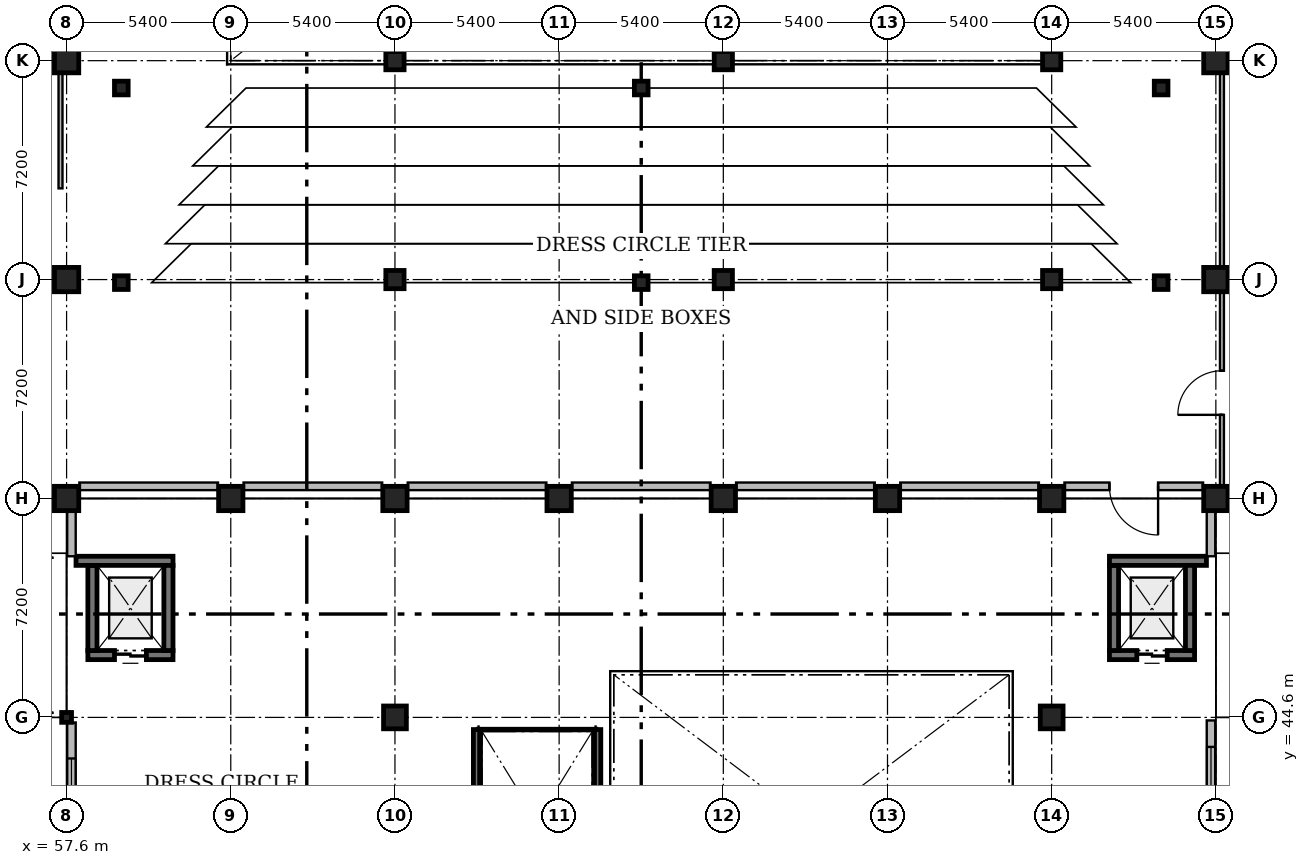
"""IFC4 building model, lengths in metres.
Left out: names, types, materials, properties, quantities, classifications, styles, units other than length and angle.
Written with IfcOpenShell. Run it as: python <this file> out.ifc"""

import sys

from ifc_helpers import new_model, si_unit, direction, frame, frame_2d, origin, origin_2d, place, context, subcontext, project, spatial, rectangle, circle, hollow_circle, extrude, element, fill, save


model = new_model("IFC4")
c1 = context("Model", 3, precision=1e-05, world=origin(), true_north=direction((0.0, 1.0)))
c2 = subcontext(c1, "Body", "Model", "MODEL_VIEW")
j1 = project(units=[si_unit("LENGTHUNIT", "METRE"), si_unit("PLANEANGLEUNIT", "RADIAN")], contexts=[c1])
p1 = place(None, origin())
s1 = spatial("IfcSite", under=j1, at=p1, CompositionType="ELEMENT")
p2 = place(p1, origin())
s2 = spatial("IfcBuilding", under=s1, at=p2, CompositionType="ELEMENT")
p3 = place(p2, frame((0.0, 0.0, 4.8)))
s3 = spatial("IfcBuildingStorey", under=s2, at=p3, CompositionType="ELEMENT", Elevation=4.8)
p4 = place(p3, frame((68.4, 44.6, 0.0), z_axis=(0.0, 0.0, 1.0), x_axis=(1.0, 0.0, 0.0)))
e1 = element("IfcColumn", 1, at=p4, inside=s3, PredefinedType="COLUMN", context=c2, shape_type="SweptSolid", body=[
    extrude(circle(Radius=0.375, at=origin_2d()), origin(), (0.0, 0.0, 1.0), 4.2),
])
p5 = place(p3, frame((68.4, 51.8, 0.0), z_axis=(0.0, 0.0, 1.0), x_axis=(1.0, 0.0, 0.0)))
e2 = element("IfcColumn", 2, at=p5, inside=s3, PredefinedType="COLUMN", context=c2, shape_type="SweptSolid", body=[
    extrude(rectangle(XDim=0.8, YDim=0.8, at=origin_2d()), origin(), (0.0, 0.0, 1.0), 4.2),
])
for number, where, z_axis, x_axis in (
    (3, (68.4, 59.0, 0.0), (0.0, 0.0, 1.0), (1.0, 0.0, 0.0)),
    (4, (68.4, 66.2, 0.0), (0.0, 0.0, 1.0), (1.0, 0.0, 0.0)),
):
    element("IfcColumn", number, at=place(p3, frame(where, z_axis=z_axis, x_axis=x_axis)), inside=s3, PredefinedType="COLUMN", context=c2, shape_type="SweptSolid", body=[
        extrude(rectangle(XDim=0.6, YDim=0.6, at=origin_2d()), origin(), (0.0, 0.0, 1.0), 4.2),
    ])
for number, where, z_axis, x_axis in (
    (5, (73.8, 51.8, 0.0), (0.0, 0.0, 1.0), (1.0, 0.0, 0.0)),
    (6, (79.2, 51.8, 0.0), (0.0, 0.0, 1.0), (1.0, 0.0, 0.0)),
):
    element("IfcColumn", number, at=place(p3, frame(where, z_axis=z_axis, x_axis=x_axis)), inside=s3, PredefinedType="COLUMN", context=c2, shape_type="SweptSolid", body=[
        extrude(rectangle(XDim=0.8, YDim=0.8, at=origin_2d()), origin(), (0.0, 0.0, 1.0), 4.2),
    ])
for number, where, z_axis, x_axis in (
    (7, (79.2, 59.0, 0.0), (0.0, 0.0, 1.0), (1.0, 0.0, 0.0)),
    (8, (79.2, 66.2, 0.0), (0.0, 0.0, 1.0), (1.0, 0.0, 0.0)),
):
    element("IfcColumn", number, at=place(p3, frame(where, z_axis=z_axis, x_axis=x_axis)), inside=s3, PredefinedType="COLUMN", context=c2, shape_type="SweptSolid", body=[
        extrude(rectangle(XDim=0.6, YDim=0.6, at=origin_2d()), origin(), (0.0, 0.0, 1.0), 4.2),
    ])
p6 = place(p3, frame((84.6, 51.8, 0.0), z_axis=(0.0, 0.0, 1.0), x_axis=(1.0, 0.0, 0.0)))
e9 = element("IfcColumn", 9, at=p6, inside=s3, PredefinedType="COLUMN", context=c2, shape_type="SweptSolid", body=[
    extrude(rectangle(XDim=0.8, YDim=0.8, at=origin_2d()), origin(), (0.0, 0.0, 1.0), 4.2),
])
p7 = place(p3, frame((90.0, 44.6, 0.0), z_axis=(0.0, 0.0, 1.0), x_axis=(1.0, 0.0, 0.0)))
e10 = element("IfcColumn", 10, at=p7, inside=s3, PredefinedType="COLUMN", context=c2, shape_type="SweptSolid", body=[
    extrude(circle(Radius=0.375, at=origin_2d()), origin(), (0.0, 0.0, 1.0), 4.2),
])
p8 = place(p3, frame((90.0, 51.8, 0.0), z_axis=(0.0, 0.0, 1.0), x_axis=(1.0, 0.0, 0.0)))
e11 = element("IfcColumn", 11, at=p8, inside=s3, PredefinedType="COLUMN", context=c2, shape_type="SweptSolid", body=[
    extrude(rectangle(XDim=0.8, YDim=0.8, at=origin_2d()), origin(), (0.0, 0.0, 1.0), 4.2),
])
for number, where, z_axis, x_axis in (
    (12, (90.0, 59.0, 0.0), (0.0, 0.0, 1.0), (1.0, 0.0, 0.0)),
    (13, (90.0, 66.2, 0.0), (0.0, 0.0, 1.0), (1.0, 0.0, 0.0)),
):
    element("IfcColumn", number, at=place(p3, frame(where, z_axis=z_axis, x_axis=x_axis)), inside=s3, PredefinedType="COLUMN", context=c2, shape_type="SweptSolid", body=[
        extrude(rectangle(XDim=0.6, YDim=0.6, at=origin_2d()), origin(), (0.0, 0.0, 1.0), 4.2),
    ])
for number, where, z_axis, x_axis in (
    (14, (95.4, 51.8, 0.0), (0.0, 0.0, 1.0), (1.0, 0.0, 0.0)),
    (15, (95.4, 59.0, 0.0), (0.0, 0.0, 1.0), (1.0, 0.0, 0.0)),
    (16, (95.4, 66.2, 0.0), (0.0, 0.0, 1.0), (1.0, 0.0, 0.0)),
):
    element("IfcColumn", number, at=place(p3, frame(where, z_axis=z_axis, x_axis=x_axis)), inside=s3, PredefinedType="COLUMN", context=c2, shape_type="SweptSolid", body=[
        extrude(rectangle(XDim=0.8, YDim=0.8, at=origin_2d()), origin(), (0.0, 0.0, 1.0), 4.2),
    ])
p9 = place(p3, frame((57.6, 44.6, 0.0), z_axis=(0.0, 0.0, 1.0), x_axis=(1.0, 0.0, 0.0)))
e17 = element("IfcColumn", 17, at=p9, inside=s3, PredefinedType="COLUMN", context=c2, shape_type="SweptSolid", body=[
    extrude(hollow_circle(Radius=0.162, WallThickness=0.012, at=origin_2d()), origin(), (0.0, 0.0, 1.0), 4.2),
])
for number, where, z_axis, x_axis in (
    (18, (57.6, 51.8, 0.0), (0.0, 0.0, 1.0), (1.0, 0.0, 0.0)),
    (19, (57.6, 59.0, 0.0), (0.0, 0.0, 1.0), (1.0, 0.0, 0.0)),
    (20, (57.6, 66.2, 0.0), (0.0, 0.0, 1.0), (1.0, 0.0, 0.0)),
    (21, (63.0, 51.8, 0.0), (0.0, 0.0, 1.0), (1.0, 0.0, 0.0)),
):
    element("IfcColumn", number, at=place(p3, frame(where, z_axis=z_axis, x_axis=x_axis)), inside=s3, PredefinedType="COLUMN", context=c2, shape_type="SweptSolid", body=[
        extrude(rectangle(XDim=0.8, YDim=0.8, at=origin_2d()), origin(), (0.0, 0.0, 1.0), 4.2),
    ])
for number, where, z_axis, x_axis in (
    (22, (59.4, 58.9, 0.0), (0.0, 0.0, 1.0), (1.0, 0.0, 0.0)),
    (23, (76.5, 58.9, 0.0), (0.0, 0.0, 1.0), (1.0, 0.0, 0.0)),
    (24, (93.6, 58.9, 0.0), (0.0, 0.0, 1.0), (1.0, 0.0, 0.0)),
    (25, (59.4, 65.3, 0.0), (0.0, 0.0, 1.0), (1.0, 0.0, 0.0)),
    (26, (76.5, 65.3, 0.0), (0.0, 0.0, 1.0), (1.0, 0.0, 0.0)),
    (27, (93.6, 65.3, 0.0), (0.0, 0.0, 1.0), (1.0, 0.0, 0.0)),
):
    element("IfcColumn", number, at=place(p3, frame(where, z_axis=z_axis, x_axis=x_axis)), inside=s3, PredefinedType="COLUMN", context=c2, shape_type="SweptSolid", body=[
        extrude(rectangle(XDim=0.45, YDim=0.45, at=origin_2d()), origin(), (0.0, 0.0, 1.0), 4.2),
    ])
p10 = place(p3, frame((61.1, 46.65, 0.0), z_axis=(0.0, 0.0, 1.0), x_axis=(-1.0, 0.0, 0.0)))
e28 = element("IfcWall", 28, at=p10, inside=s3, PredefinedType="SOLIDWALL", context=c2, shape_type="SweptSolid", body=[
    extrude(rectangle(XDim=2.8, YDim=0.3, at=frame_2d((1.4, 0.0))), origin(), (0.0, 0.0, 1.0), 4.2),
])
p11 = place(p10, frame((0.875, 0.0, 0.0)))
e29 = element("IfcOpeningElement", 29, at=p11, cuts=e28, PredefinedType="OPENING", context=c2, shape_type="SweptSolid", body=[
    extrude(rectangle(XDim=1.05, YDim=2.1, at=frame_2d((0.525, 1.05))), frame((0.0, 0.17, 0.0), z_axis=(0.0, -1.0, 0.0), x_axis=(1.0, 0.0, 0.0)), (0.0, 0.0, 1.0), 0.34),
])
p12 = place(p3, frame((58.45, 46.8, 0.0), z_axis=(0.0, 0.0, 1.0), x_axis=(0.0, 1.0, 0.0)))
e30 = element("IfcWall", 30, at=p12, inside=s3, PredefinedType="SOLIDWALL", context=c2, shape_type="SweptSolid", body=[
    extrude(rectangle(XDim=2.8, YDim=0.3, at=frame_2d((1.4, 0.0))), origin(), (0.0, 0.0, 1.0), 4.2),
])
p13 = place(p3, frame((57.91, 49.75, 0.0), z_axis=(0.0, 0.0, 1.0), x_axis=(1.0, 0.0, 0.0)))
e31 = element("IfcWall", 31, at=p13, inside=s3, PredefinedType="SOLIDWALL", context=c2, shape_type="SweptSolid", body=[
    extrude(rectangle(XDim=3.19, YDim=0.3, at=frame_2d((1.595, 0.0))), origin(), (0.0, 0.0, 1.0), 4.2),
])
p14 = place(p3, frame((60.95, 49.6, 0.0), z_axis=(0.0, 0.0, 1.0), x_axis=(0.0, -1.0, 0.0)))
e32 = element("IfcWall", 32, at=p14, inside=s3, PredefinedType="SOLIDWALL", context=c2, shape_type="SweptSolid", body=[
    extrude(rectangle(XDim=2.8, YDim=0.3, at=frame_2d((1.4, 0.0))), origin(), (0.0, 0.0, 1.0), 4.2),
])
p15 = place(p3, frame((94.7, 46.65, 0.0), z_axis=(0.0, 0.0, 1.0), x_axis=(-1.0, 0.0, 0.0)))
e33 = element("IfcWall", 33, at=p15, inside=s3, PredefinedType="SOLIDWALL", context=c2, shape_type="SweptSolid", body=[
    extrude(rectangle(XDim=2.8, YDim=0.3, at=frame_2d((1.4, 0.0))), origin(), (0.0, 0.0, 1.0), 4.2),
])
p16 = place(p15, frame((0.9, 0.0, 0.0)))
e34 = element("IfcOpeningElement", 34, at=p16, cuts=e33, PredefinedType="OPENING", context=c2, shape_type="SweptSolid", body=[
    extrude(rectangle(XDim=1.0, YDim=2.1, at=frame_2d((0.5, 1.05))), frame((0.0, 0.17, 0.0), z_axis=(0.0, -1.0, 0.0), x_axis=(1.0, 0.0, 0.0)), (0.0, 0.0, 1.0), 0.34),
])
p17 = place(p3, frame((92.05, 46.8, 0.0), z_axis=(0.0, 0.0, 1.0), x_axis=(0.0, 1.0, 0.0)))
e35 = element("IfcWall", 35, at=p17, inside=s3, PredefinedType="SOLIDWALL", context=c2, shape_type="SweptSolid", body=[
    extrude(rectangle(XDim=2.8, YDim=0.3, at=frame_2d((1.4, 0.0))), origin(), (0.0, 0.0, 1.0), 4.2),
])
p18 = place(p3, frame((91.9, 49.75, 0.0), z_axis=(0.0, 0.0, 1.0), x_axis=(1.0, 0.0, 0.0)))
e36 = element("IfcWall", 36, at=p18, inside=s3, PredefinedType="SOLIDWALL", context=c2, shape_type="SweptSolid", body=[
    extrude(rectangle(XDim=3.19, YDim=0.3, at=frame_2d((1.595, 0.0))), origin(), (0.0, 0.0, 1.0), 4.2),
])
p19 = place(p3, frame((94.55, 49.6, 0.0), z_axis=(0.0, 0.0, 1.0), x_axis=(0.0, -1.0, 0.0)))
e37 = element("IfcWall", 37, at=p19, inside=s3, PredefinedType="SOLIDWALL", context=c2, shape_type="SweptSolid", body=[
    extrude(rectangle(XDim=2.8, YDim=0.3, at=frame_2d((1.4, 0.0))), origin(), (0.0, 0.0, 1.0), 4.2),
])
for number, where, z_axis, x_axis in (
    (38, (71.09, 36.6, 0.0), (0.0, 0.0, 1.0), (0.0, 1.0, 0.0)),
    (39, (75.06, 36.6, 0.0), (0.0, 0.0, 1.0), (0.0, 1.0, 0.0)),
):
    element("IfcWall", number, at=place(p3, frame(where, z_axis=z_axis, x_axis=x_axis)), inside=s3, PredefinedType="SOLIDWALL", context=c2, shape_type="SweptSolid", body=[
        extrude(rectangle(XDim=7.6, YDim=0.22, at=frame_2d((3.8, 0.0))), origin(), (0.0, 0.0, 1.0), 3.95),
    ])
p20 = place(p3, frame((57.76, 37.78, 0.0), z_axis=(0.0, 0.0, 1.0), x_axis=(0.0, 1.0, 0.0)))
e40 = element("IfcWall", 40, at=p20, inside=s3, PredefinedType="SOLIDWALL", context=c2, shape_type="SweptSolid", body=[
    extrude(rectangle(XDim=6.653, YDim=0.28, at=frame_2d((3.327, 0.0))), origin(), (0.0, 0.0, 1.0), 3.653),
])
p21 = place(p20, frame((1.183, 0.0, 0.95)))
e41 = element("IfcOpeningElement", 41, at=p21, cuts=e40, PredefinedType="OPENING", context=c2, shape_type="SweptSolid", body=[
    extrude(rectangle(XDim=0.96, YDim=1.8, at=frame_2d((0.48, 0.9))), frame((0.0, 0.16, 0.0), z_axis=(0.0, -1.0, 0.0), x_axis=(1.0, 0.0, 0.0)), (0.0, 0.0, 1.0), 0.32),
])
p22 = place(p20, frame((4.51, 0.0, 0.95)))
e42 = element("IfcOpeningElement", 42, at=p22, cuts=e40, PredefinedType="OPENING", context=c2, shape_type="SweptSolid", body=[
    extrude(rectangle(XDim=0.96, YDim=1.8, at=frame_2d((0.48, 0.9))), frame((0.0, 0.16, 0.0), z_axis=(0.0, -1.0, 0.0), x_axis=(1.0, 0.0, 0.0)), (0.0, 0.0, 1.0), 0.32),
])
p23 = place(p3, frame((95.24, 37.78, 0.0), z_axis=(0.0, 0.0, 1.0), x_axis=(0.0, 1.0, 0.0)))
e43 = element("IfcWall", 43, at=p23, inside=s3, PredefinedType="SOLIDWALL", context=c2, shape_type="SweptSolid", body=[
    extrude(rectangle(XDim=6.72, YDim=0.28, at=frame_2d((3.36, 0.0))), origin(), (0.0, 0.0, 1.0), 3.373),
])
p24 = place(p23, frame((0.87, 0.0, 0.95)))
e44 = element("IfcOpeningElement", 44, at=p24, cuts=e43, PredefinedType="OPENING", context=c2, shape_type="SweptSolid", body=[
    extrude(rectangle(XDim=1.62, YDim=1.75, at=frame_2d((0.81, 0.875))), frame((0.0, 0.16, 0.0), z_axis=(0.0, -1.0, 0.0), x_axis=(1.0, 0.0, 0.0)), (0.0, 0.0, 1.0), 0.32),
])
p25 = place(p23, frame((4.23, 0.0, 0.95)))
e45 = element("IfcOpeningElement", 45, at=p25, cuts=e43, PredefinedType="OPENING", context=c2, shape_type="SweptSolid", body=[
    extrude(rectangle(XDim=1.62, YDim=1.75, at=frame_2d((0.81, 0.875))), frame((0.0, 0.16, 0.0), z_axis=(0.0, -1.0, 0.0), x_axis=(1.0, 0.0, 0.0)), (0.0, 0.0, 1.0), 0.32),
])
p26 = place(p3, frame((57.76, 49.9, 0.0), z_axis=(0.0, 0.0, 1.0), x_axis=(0.0, 1.0, 0.0)))
e46 = element("IfcWall", 46, at=p26, inside=s3, PredefinedType="SOLIDWALL", context=c2, shape_type="SweptSolid", body=[
    extrude(rectangle(XDim=1.95, YDim=0.28, at=frame_2d((0.975, 0.0))), origin(), (0.0, 0.0, 1.0), 2.723),
])
p27 = place(p3, frame((95.24, 49.9, 0.0), z_axis=(0.0, 0.0, 1.0), x_axis=(0.0, 1.0, 0.0)))
e47 = element("IfcWall", 47, at=p27, inside=s3, PredefinedType="SOLIDWALL", context=c2, shape_type="SweptSolid", body=[
    extrude(rectangle(XDim=1.95, YDim=0.28, at=frame_2d((0.975, 0.0))), origin(), (0.0, 0.0, 1.0), 3.373),
])
p28 = place(p3, frame((94.98, 52.2, 0.0), z_axis=(0.0, 0.0, 1.0), x_axis=(-1.0, 0.0, 0.0)))
e48 = element("IfcWall", 48, at=p28, inside=s3, PredefinedType="PARTITIONING", context=c2, shape_type="SweptSolid", body=[
    extrude(rectangle(XDim=4.56, YDim=0.25, at=frame_2d((2.28, 0.0))), origin(), (0.0, 0.0, 1.0), 3.26),
])
p29 = place(p28, frame((1.48, 0.0, 0.0)))
e49 = element("IfcOpeningElement", 49, at=p29, cuts=e48, PredefinedType="OPENING", context=c2, shape_type="SweptSolid", body=[
    extrude(rectangle(XDim=1.6, YDim=2.25, at=frame_2d((0.8, 1.125))), frame((0.0, 0.145, 0.0), z_axis=(0.0, -1.0, 0.0), x_axis=(1.0, 0.0, 0.0)), (0.0, 0.0, 1.0), 0.29),
])
p30 = place(p3, frame((89.58, 52.2, 0.0), z_axis=(0.0, 0.0, 1.0), x_axis=(-1.0, 0.0, 0.0)))
e50 = element("IfcWall", 50, at=p30, inside=s3, PredefinedType="PARTITIONING", context=c2, shape_type="SweptSolid", body=[
    extrude(rectangle(XDim=4.56, YDim=0.25, at=frame_2d((2.28, 0.0))), origin(), (0.0, 0.0, 1.0), 3.26),
])
p31 = place(p3, frame((84.18, 52.2, 0.0), z_axis=(0.0, 0.0, 1.0), x_axis=(-1.0, 0.0, 0.0)))
e51 = element("IfcWall", 51, at=p31, inside=s3, PredefinedType="PARTITIONING", context=c2, shape_type="SweptSolid", body=[
    extrude(rectangle(XDim=4.56, YDim=0.25, at=frame_2d((2.28, 0.0))), origin(), (0.0, 0.0, 1.0), 3.26),
])
p32 = place(p3, frame((78.78, 52.2, 0.0), z_axis=(0.0, 0.0, 1.0), x_axis=(-1.0, 0.0, 0.0)))
e52 = element("IfcWall", 52, at=p32, inside=s3, PredefinedType="PARTITIONING", context=c2, shape_type="SweptSolid", body=[
    extrude(rectangle(XDim=4.56, YDim=0.25, at=frame_2d((2.28, 0.0))), origin(), (0.0, 0.0, 1.0), 3.26),
])
p33 = place(p3, frame((73.38, 52.2, 0.0), z_axis=(0.0, 0.0, 1.0), x_axis=(-1.0, 0.0, 0.0)))
e53 = element("IfcWall", 53, at=p33, inside=s3, PredefinedType="PARTITIONING", context=c2, shape_type="SweptSolid", body=[
    extrude(rectangle(XDim=4.56, YDim=0.25, at=frame_2d((2.28, 0.0))), origin(), (0.0, 0.0, 1.0), 3.26),
])
for number, where, z_axis, x_axis in (
    (54, (67.98, 52.2, 0.0), (0.0, 0.0, 1.0), (-1.0, 0.0, 0.0)),
    (55, (62.58, 52.2, 0.0), (0.0, 0.0, 1.0), (-1.0, 0.0, 0.0)),
):
    element("IfcWall", number, at=place(p3, frame(where, z_axis=z_axis, x_axis=x_axis)), inside=s3, PredefinedType="PARTITIONING", context=c2, shape_type="SweptSolid", body=[
        extrude(rectangle(XDim=4.56, YDim=0.25, at=frame_2d((2.28, 0.0))), origin(), (0.0, 0.0, 1.0), 3.26),
    ])
p34 = place(p3, frame((57.4, 65.78, 0.0), z_axis=(0.0, 0.0, 1.0), x_axis=(0.0, -1.0, 0.0)))
e56 = element("IfcWall", 56, at=p34, inside=s3, PredefinedType="PARTITIONING", context=c2, shape_type="SweptSolid", body=[
    extrude(rectangle(XDim=3.78, YDim=0.13, at=frame_2d((1.89, 0.0))), origin(), (0.0, 0.0, 1.0), 3.55),
])
p35 = place(p3, frame((95.6, 52.22, 0.0), z_axis=(0.0, 0.0, 1.0), x_axis=(0.0, 1.0, 0.0)))
e57 = element("IfcWall", 57, at=p35, inside=s3, PredefinedType="PARTITIONING", context=c2, shape_type="SweptSolid", body=[
    extrude(rectangle(XDim=6.36, YDim=0.13, at=frame_2d((3.18, 0.0))), origin(), (0.0, 0.0, 1.0), 3.55),
])
p36 = place(p35, frame((2.331, 0.0, 0.0)))
e58 = element("IfcOpeningElement", 58, at=p36, cuts=e57, PredefinedType="OPENING", context=c2, shape_type="SweptSolid", body=[
    extrude(rectangle(XDim=1.45, YDim=2.2, at=frame_2d((0.725, 1.1))), frame((0.0, 0.085, 0.0), z_axis=(0.0, -1.0, 0.0), x_axis=(1.0, 0.0, 0.0)), (0.0, 0.0, 1.0), 0.17),
])
p37 = place(p3, frame((95.6, 59.42, 0.0), z_axis=(0.0, 0.0, 1.0), x_axis=(0.0, 1.0, 0.0)))
e59 = element("IfcWall", 59, at=p37, inside=s3, PredefinedType="PARTITIONING", context=c2, shape_type="SweptSolid", body=[
    extrude(rectangle(XDim=6.36, YDim=0.13, at=frame_2d((3.18, 0.0))), origin(), (0.0, 0.0, 1.0), 3.55),
])
p38 = place(p11, origin())
e60 = element("IfcDoor", 60, at=p38, inside=s3, OperationType="DOUBLE_DOOR_SLIDING", PredefinedType="DOOR", context=c2, shape_type="SweptSolid", body=[
    extrude(rectangle(XDim=1.05, YDim=2.1, at=frame_2d((0.525, 1.05))), frame((0.0, 0.025, 0.0), z_axis=(0.0, -1.0, 0.0), x_axis=(1.0, 0.0, 0.0)), (0.0, 0.0, 1.0), 0.05),
])
fill(e29, e60)
p39 = place(p16, origin())
e61 = element("IfcDoor", 61, at=p39, inside=s3, OperationType="DOUBLE_DOOR_SLIDING", PredefinedType="DOOR", context=c2, shape_type="SweptSolid", body=[
    extrude(rectangle(XDim=1.0, YDim=2.1, at=frame_2d((0.5, 1.05))), frame((0.0, 0.025, 0.0), z_axis=(0.0, -1.0, 0.0), x_axis=(1.0, 0.0, 0.0)), (0.0, 0.0, 1.0), 0.05),
])
fill(e34, e61)
p40 = place(p22, origin())
e62 = element("IfcWindow", 62, at=p40, inside=s3, PartitioningType="SINGLE_PANEL", PredefinedType="WINDOW", context=c2, shape_type="SweptSolid", body=[
    extrude(rectangle(XDim=0.96, YDim=1.8, at=frame_2d((0.48, 0.9))), frame((0.0, 0.03, 0.0), z_axis=(0.0, -1.0, 0.0), x_axis=(1.0, 0.0, 0.0)), (0.0, 0.0, 1.0), 0.06),
])
fill(e42, e62)
p41 = place(p25, origin())
e63 = element("IfcWindow", 63, at=p41, inside=s3, PartitioningType="SINGLE_PANEL", PredefinedType="WINDOW", context=c2, shape_type="SweptSolid", body=[
    extrude(rectangle(XDim=1.62, YDim=1.75, at=frame_2d((0.81, 0.875))), frame((0.0, 0.03, 0.0), z_axis=(0.0, -1.0, 0.0), x_axis=(1.0, 0.0, 0.0)), (0.0, 0.0, 1.0), 0.06),
])
fill(e45, e63)
p42 = place(p29, origin())
e64 = element("IfcDoor", 64, at=p42, inside=s3, OperationType="DOUBLE_DOOR_SINGLE_SWING", PredefinedType="DOOR", context=c2, shape_type="SweptSolid", body=[
    extrude(rectangle(XDim=1.6, YDim=2.25, at=frame_2d((0.8, 1.125))), frame((0.0, 0.025, 0.0), z_axis=(0.0, -1.0, 0.0), x_axis=(1.0, 0.0, 0.0)), (0.0, 0.0, 1.0), 0.05),
])
fill(e49, e64)
p43 = place(p36, origin())
e65 = element("IfcDoor", 65, at=p43, inside=s3, OperationType="DOUBLE_DOOR_SINGLE_SWING", PredefinedType="DOOR", context=c2, shape_type="SweptSolid", body=[
    extrude(rectangle(XDim=1.45, YDim=2.2, at=frame_2d((0.725, 1.1))), frame((0.0, 0.025, 0.0), z_axis=(0.0, -1.0, 0.0), x_axis=(1.0, 0.0, 0.0)), (0.0, 0.0, 1.0), 0.05),
])
fill(e58, e65)
save(model, sys.argv[1])
